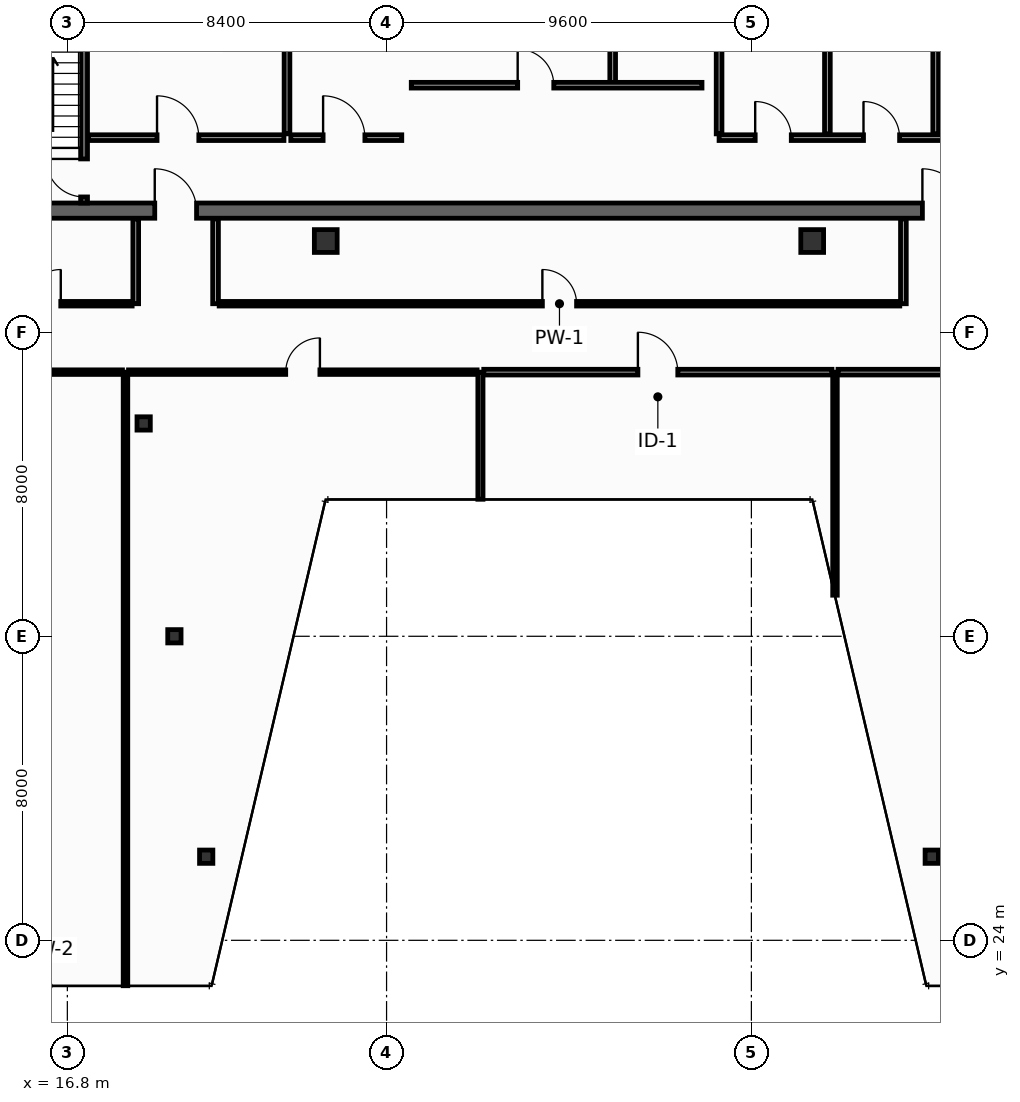
"""IFC4 building model, lengths in metres.
Left out: names, types, materials, properties, quantities, classifications, styles, units other than length and angle.
Written with IfcOpenShell. Run it as: python <this file> out.ifc"""

import sys

from ifc_helpers import new_model, si_unit, direction, frame, frame_2d, origin, origin_2d, place, context, subcontext, project, spatial, rectangle, hollow_rectangle, extrude, element, fill, save


model = new_model("IFC4")
c1 = context("Model", 3, precision=1e-05, world=origin(), true_north=direction((0.0, 1.0)))
c2 = subcontext(c1, "Body", "Model", "MODEL_VIEW")
j1 = project(units=[si_unit("LENGTHUNIT", "METRE"), si_unit("PLANEANGLEUNIT", "RADIAN")], contexts=[c1])
p1 = place(None, origin())
s1 = spatial("IfcSite", under=j1, at=p1, CompositionType="ELEMENT")
p2 = place(p1, origin())
s2 = spatial("IfcBuilding", under=s1, at=p2, CompositionType="ELEMENT")
p3 = place(p2, frame((0.0, 0.0, 264.8)))
s3 = spatial("IfcBuildingStorey", under=s2, at=p3, CompositionType="ELEMENT", Elevation=264.8)
p4 = place(p3, frame((13.7, 43.2, 0.0), z_axis=(0.0, 0.0, 1.0), x_axis=(1.0, 0.0, 0.0)))
e1 = element("IfcWall", 1, at=p4, inside=s3, PredefinedType="SHEAR", context=c2, shape_type="SweptSolid", body=[
    extrude(rectangle(XDim=32.5, YDim=0.4, at=frame_2d((16.25, 0.0))), origin(), (0.0, 0.0, 1.0), 3.55),
])
p5 = place(p4, frame((5.4, 0.0, 0.0)))
e2 = element("IfcOpeningElement", 2, at=p5, cuts=e1, PredefinedType="OPENING", context=c2, shape_type="SweptSolid", body=[
    extrude(rectangle(XDim=1.1, YDim=2.15, at=frame_2d((0.55, 1.075))), frame((0.0, 0.21, 0.0), z_axis=(0.0, -1.0, 0.0), x_axis=(1.0, 0.0, 0.0)), (0.0, 0.0, 1.0), 0.42),
])
p6 = place(p4, frame((25.6, 0.0, 0.0)))
e3 = element("IfcOpeningElement", 3, at=p6, cuts=e1, PredefinedType="OPENING", context=c2, shape_type="SweptSolid", body=[
    extrude(rectangle(XDim=1.1, YDim=2.15, at=frame_2d((0.55, 1.075))), frame((0.0, 0.21, 0.0), z_axis=(0.0, -1.0, 0.0), x_axis=(1.0, 0.0, 0.0)), (0.0, 0.0, 1.0), 0.42),
])
for number, where, z_axis, x_axis in (
    (4, (23.6, 42.4, 0.0), (0.0, 0.0, 1.0), (1.0, 0.0, 0.0)),
    (5, (36.4, 42.4, 0.0), (0.0, 0.0, 1.0), (1.0, 0.0, 0.0)),
):
    element("IfcColumn", number, at=place(p3, frame(where, z_axis=z_axis, x_axis=x_axis)), inside=s3, PredefinedType="COLUMN", context=c2, shape_type="SweptSolid", body=[
        extrude(hollow_rectangle(XDim=0.6, YDim=0.6, WallThickness=0.028, at=origin_2d()), origin(), (0.0, 0.0, 1.0), 3.8),
    ])
for number, where, z_axis, x_axis in (
    (6, (20.454, 26.2, 0.0), (0.0, 0.0, 1.0), (1.0, 0.0, 0.0)),
    (7, (39.546, 26.2, 0.0), (0.0, 0.0, 1.0), (1.0, 0.0, 0.0)),
    (8, (19.617, 32.0, 0.0), (0.0, 0.0, 1.0), (1.0, 0.0, 0.0)),
    (9, (18.808, 37.6, 0.0), (0.0, 0.0, 1.0), (1.0, 0.0, 0.0)),
):
    element("IfcColumn", number, at=place(p3, frame(where, z_axis=z_axis, x_axis=x_axis)), inside=s3, PredefinedType="COLUMN", context=c2, shape_type="SweptSolid", body=[
        extrude(hollow_rectangle(XDim=0.35, YDim=0.35, WallThickness=0.016, at=origin_2d()), origin(), (0.0, 0.0, 1.0), 3.8),
    ])
p7 = place(p3, frame((17.24, 43.4, 0.0), z_axis=(0.0, 0.0, 1.0), x_axis=(0.0, 1.0, 0.0)))
e10 = element("IfcWall", 10, at=p7, inside=s3, PredefinedType="SHEAR", context=c2, shape_type="SweptSolid", body=[
    extrude(rectangle(XDim=10.4, YDim=0.18, at=frame_2d((5.2, 0.0))), origin(), (0.0, 0.0, 1.0), 3.55),
])
p8 = place(p7, frame((0.16, 0.0, 0.0)))
e11 = element("IfcOpeningElement", 11, at=p8, cuts=e10, PredefinedType="OPENING", context=c2, shape_type="SweptSolid", body=[
    extrude(rectangle(XDim=1.0, YDim=2.15, at=frame_2d((0.5, 1.075))), frame((0.0, 0.1, 0.0), z_axis=(0.0, -1.0, 0.0), x_axis=(1.0, 0.0, 0.0)), (0.0, 0.0, 1.0), 0.2),
])
p9 = place(p3, frame((17.36, 45.12, 0.0), z_axis=(0.0, 0.0, 1.0), x_axis=(1.0, 0.0, 0.0)))
e12 = element("IfcWall", 12, at=p9, inside=s3, PredefinedType="PARTITIONING", context=c2, shape_type="SweptSolid", body=[
    extrude(rectangle(XDim=5.14, YDim=0.15, at=frame_2d((2.57, 0.0))), origin(), (0.0, 0.0, 1.0), 3.55),
])
p10 = place(p9, frame((1.8, 0.0, 0.0)))
e13 = element("IfcOpeningElement", 13, at=p10, cuts=e12, PredefinedType="OPENING", context=c2, shape_type="SweptSolid", body=[
    extrude(rectangle(XDim=1.1, YDim=2.15, at=frame_2d((0.55, 1.075))), frame((0.0, 0.085, 0.0), z_axis=(0.0, -1.0, 0.0), x_axis=(1.0, 0.0, 0.0)), (0.0, 0.0, 1.0), 0.17),
])
p11 = place(p3, frame((22.58, 50.55, 0.0), z_axis=(0.0, 0.0, 1.0), x_axis=(0.0, -1.0, 0.0)))
e14 = element("IfcWall", 14, at=p11, inside=s3, PredefinedType="PARTITIONING", context=c2, shape_type="SweptSolid", body=[
    extrude(rectangle(XDim=5.33, YDim=0.15, at=frame_2d((2.665, 0.0))), origin(), (0.0, 0.0, 1.0), 3.55),
])
p12 = place(p11, frame((1.8, 0.0, 0.0)))
e15 = element("IfcOpeningElement", 15, at=p12, cuts=e14, PredefinedType="OPENING", context=c2, shape_type="SweptSolid", body=[
    extrude(rectangle(XDim=1.1, YDim=2.15, at=frame_2d((0.55, 1.075))), frame((0.0, 0.085, 0.0), z_axis=(0.0, -1.0, 0.0), x_axis=(1.0, 0.0, 0.0)), (0.0, 0.0, 1.0), 0.17),
])
p13 = place(p3, frame((22.68, 45.12, 0.0), z_axis=(0.0, 0.0, 1.0), x_axis=(1.0, 0.0, 0.0)))
e16 = element("IfcWall", 16, at=p13, inside=s3, PredefinedType="PARTITIONING", context=c2, shape_type="SweptSolid", body=[
    extrude(rectangle(XDim=2.92, YDim=0.15, at=frame_2d((1.46, 0.0))), origin(), (0.0, 0.0, 1.0), 3.55),
])
p14 = place(p13, frame((0.85, 0.0, 0.0)))
e17 = element("IfcOpeningElement", 17, at=p14, cuts=e16, PredefinedType="OPENING", context=c2, shape_type="SweptSolid", body=[
    extrude(rectangle(XDim=1.1, YDim=2.15, at=frame_2d((0.55, 1.075))), frame((0.0, 0.085, 0.0), z_axis=(0.0, -1.0, 0.0), x_axis=(1.0, 0.0, 0.0)), (0.0, 0.0, 1.0), 0.17),
])
p15 = place(p3, frame((31.15, 46.5, 0.0), z_axis=(0.0, 0.0, 1.0), x_axis=(0.0, 1.0, 0.0)))
e18 = element("IfcWall", 18, at=p15, inside=s3, PredefinedType="PARTITIONING", context=c2, shape_type="SweptSolid", body=[
    extrude(rectangle(XDim=4.35, YDim=0.15, at=frame_2d((2.175, 0.0))), origin(), (0.0, 0.0, 1.0), 3.55),
])
p16 = place(p15, frame((1.5, 0.0, 0.0)))
e19 = element("IfcOpeningElement", 19, at=p16, cuts=e18, PredefinedType="OPENING", context=c2, shape_type="SweptSolid", body=[
    extrude(rectangle(XDim=1.05, YDim=2.15, at=frame_2d((0.525, 1.075))), frame((0.0, 0.085, 0.0), z_axis=(0.0, -1.0, 0.0), x_axis=(1.0, 0.0, 0.0)), (0.0, 0.0, 1.0), 0.17),
])
p17 = place(p3, frame((33.95, 45.12, 0.0), z_axis=(0.0, 0.0, 1.0), x_axis=(1.0, 0.0, 0.0)))
e20 = element("IfcWall", 20, at=p17, inside=s3, PredefinedType="PARTITIONING", context=c2, shape_type="SweptSolid", body=[
    extrude(rectangle(XDim=8.55, YDim=0.15, at=frame_2d((4.275, 0.0))), origin(), (0.0, 0.0, 1.0), 3.55),
])
p18 = place(p17, frame((0.95, 0.0, 0.0)))
e21 = element("IfcOpeningElement", 21, at=p18, cuts=e20, PredefinedType="OPENING", context=c2, shape_type="SweptSolid", body=[
    extrude(rectangle(XDim=0.95, YDim=2.15, at=frame_2d((0.475, 1.075))), frame((0.0, 0.085, 0.0), z_axis=(0.0, -1.0, 0.0), x_axis=(1.0, 0.0, 0.0)), (0.0, 0.0, 1.0), 0.17),
])
p19 = place(p17, frame((3.8, 0.0, 0.0)))
e22 = element("IfcOpeningElement", 22, at=p19, cuts=e20, PredefinedType="OPENING", context=c2, shape_type="SweptSolid", body=[
    extrude(rectangle(XDim=0.95, YDim=2.15, at=frame_2d((0.475, 1.075))), frame((0.0, 0.085, 0.0), z_axis=(0.0, -1.0, 0.0), x_axis=(1.0, 0.0, 0.0)), (0.0, 0.0, 1.0), 0.17),
])
p20 = place(p17, frame((6.65, 0.0, 0.0)))
e23 = element("IfcOpeningElement", 23, at=p20, cuts=e20, PredefinedType="OPENING", context=c2, shape_type="SweptSolid", body=[
    extrude(rectangle(XDim=0.95, YDim=2.15, at=frame_2d((0.475, 1.075))), frame((0.0, 0.085, 0.0), z_axis=(0.0, -1.0, 0.0), x_axis=(1.0, 0.0, 0.0)), (0.0, 0.0, 1.0), 0.17),
])
for number, where, z_axis, x_axis in (
    (24, (33.95, 45.22, 0.0), (0.0, 0.0, 1.0), (0.0, 1.0, 0.0)),
    (25, (36.8, 45.22, 0.0), (0.0, 0.0, 1.0), (0.0, 1.0, 0.0)),
    (26, (39.65, 45.22, 0.0), (0.0, 0.0, 1.0), (0.0, 1.0, 0.0)),
):
    element("IfcWall", number, at=place(p3, frame(where, z_axis=z_axis, x_axis=x_axis)), inside=s3, PredefinedType="PARTITIONING", context=c2, shape_type="SweptSolid", body=[
        extrude(rectangle(XDim=2.33, YDim=0.15, at=frame_2d((1.165, 0.0))), origin(), (0.0, 0.0, 1.0), 3.55),
    ])
p21 = place(p3, frame((25.85, 46.5, 0.0), z_axis=(0.0, 0.0, 1.0), x_axis=(1.0, 0.0, 0.0)))
e27 = element("IfcWall", 27, at=p21, inside=s3, PredefinedType="PARTITIONING", context=c2, shape_type="SweptSolid", body=[
    extrude(rectangle(XDim=7.65, YDim=0.15, at=frame_2d((3.825, 0.0))), origin(), (0.0, 0.0, 1.0), 3.55),
])
p22 = place(p21, frame((2.8, 0.0, 0.0)))
e28 = element("IfcOpeningElement", 28, at=p22, cuts=e27, PredefinedType="OPENING", context=c2, shape_type="SweptSolid", body=[
    extrude(rectangle(XDim=0.95, YDim=2.15, at=frame_2d((0.475, 1.075))), frame((0.0, 0.085, 0.0), z_axis=(0.0, -1.0, 0.0), x_axis=(1.0, 0.0, 0.0)), (0.0, 0.0, 1.0), 0.17),
])
for number, where, z_axis, x_axis in (
    (29, (18.6, 40.75, 0.0), (0.0, 0.0, 1.0), (0.0, 1.0, 0.0)),
    (30, (20.7, 40.75, 0.0), (0.0, 0.0, 1.0), (0.0, 1.0, 0.0)),
    (31, (38.8, 40.75, 0.0), (0.0, 0.0, 1.0), (0.0, 1.0, 0.0)),
):
    element("IfcWall", number, at=place(p3, frame(where, z_axis=z_axis, x_axis=x_axis)), inside=s3, PredefinedType="PARTITIONING", context=c2, shape_type="SweptSolid", body=[
        extrude(rectangle(XDim=2.23, YDim=0.15, at=frame_2d((1.115, 0.0))), origin(), (0.0, 0.0, 1.0), 3.55),
    ])
p23 = place(p3, frame((13.85, 40.75, 0.0), z_axis=(0.0, 0.0, 1.0), x_axis=(1.0, 0.0, 0.0)))
e32 = element("IfcWall", 32, at=p23, inside=s3, PredefinedType="PARTITIONING", context=c2, shape_type="SweptSolid", body=[
    extrude(rectangle(XDim=4.655, YDim=0.12, at=frame_2d((2.327, 0.0))), origin(), (0.0, 0.0, 1.0), 3.55),
])
p24 = place(p23, frame((1.877, 0.0, 0.0)))
e33 = element("IfcOpeningElement", 33, at=p24, cuts=e32, PredefinedType="OPENING", context=c2, shape_type="SweptSolid", body=[
    extrude(rectangle(XDim=0.9, YDim=2.1, at=frame_2d((0.45, 1.05))), frame((0.0, 0.07, 0.0), z_axis=(0.0, -1.0, 0.0), x_axis=(1.0, 0.0, 0.0)), (0.0, 0.0, 1.0), 0.14),
])
p25 = place(p3, frame((20.795, 40.75, 0.0), z_axis=(0.0, 0.0, 1.0), x_axis=(1.0, 0.0, 0.0)))
e34 = element("IfcWall", 34, at=p25, inside=s3, PredefinedType="PARTITIONING", context=c2, shape_type="SweptSolid", body=[
    extrude(rectangle(XDim=17.91, YDim=0.12, at=frame_2d((8.955, 0.0))), origin(), (0.0, 0.0, 1.0), 2.947),
])
p26 = place(p25, frame((8.505, 0.0, 0.0)))
e35 = element("IfcOpeningElement", 35, at=p26, cuts=e34, PredefinedType="OPENING", context=c2, shape_type="SweptSolid", body=[
    extrude(rectangle(XDim=0.9, YDim=2.1, at=frame_2d((0.45, 1.05))), frame((0.0, 0.07, 0.0), z_axis=(0.0, -1.0, 0.0), x_axis=(1.0, 0.0, 0.0)), (0.0, 0.0, 1.0), 0.14),
])
p27 = place(p3, frame((18.33, 22.805, 0.0), z_axis=(0.0, 0.0, 1.0), x_axis=(0.0, 1.0, 0.0)))
e36 = element("IfcWall", 36, at=p27, inside=s3, PredefinedType="PARTITIONING", context=c2, shape_type="SweptSolid", body=[
    extrude(rectangle(XDim=16.145, YDim=0.12, at=frame_2d((8.073, 0.0))), origin(), (0.0, 0.0, 1.0), 2.947),
])
p28 = place(p3, frame((27.67, 35.605, 0.0), z_axis=(0.0, 0.0, 1.0), x_axis=(0.0, 1.0, 0.0)))
e37 = element("IfcWall", 37, at=p28, inside=s3, PredefinedType="PARTITIONING", context=c2, shape_type="SweptSolid", body=[
    extrude(rectangle(XDim=3.345, YDim=0.135, at=frame_2d((1.672, 0.0))), origin(), (0.0, 0.0, 1.0), 3.55),
])
p29 = place(p3, frame((37.0, 33.081, 0.0), z_axis=(0.0, 0.0, 1.0), x_axis=(0.0, 1.0, 0.0)))
e38 = element("IfcWall", 38, at=p29, inside=s3, PredefinedType="PARTITIONING", context=c2, shape_type="SweptSolid", body=[
    extrude(rectangle(XDim=5.869, YDim=0.12, at=frame_2d((2.935, 0.0))), origin(), (0.0, 0.0, 1.0), 3.55),
])
p30 = place(p3, frame((6.483, 38.95, 0.0), z_axis=(0.0, 0.0, 1.0), x_axis=(1.0, 0.0, 0.0)))
e39 = element("IfcWall", 39, at=p30, inside=s3, PredefinedType="PARTITIONING", context=c2, shape_type="SweptSolid", body=[
    extrude(rectangle(XDim=11.767, YDim=0.12, at=frame_2d((5.883, 0.0))), origin(), (0.0, 0.0, 1.0), 3.085),
])
p31 = place(p30, frame((5.433, 0.0, 0.0)))
e40 = element("IfcOpeningElement", 40, at=p31, cuts=e39, PredefinedType="OPENING", context=c2, shape_type="SweptSolid", body=[
    extrude(rectangle(XDim=0.9, YDim=2.1, at=frame_2d((0.45, 1.05))), frame((0.0, 0.07, 0.0), z_axis=(0.0, -1.0, 0.0), x_axis=(1.0, 0.0, 0.0)), (0.0, 0.0, 1.0), 0.14),
])
p32 = place(p3, frame((18.41, 38.95, 0.0), z_axis=(0.0, 0.0, 1.0), x_axis=(1.0, 0.0, 0.0)))
e41 = element("IfcWall", 41, at=p32, inside=s3, PredefinedType="PARTITIONING", context=c2, shape_type="SweptSolid", body=[
    extrude(rectangle(XDim=9.173, YDim=0.12, at=frame_2d((4.586, 0.0))), origin(), (0.0, 0.0, 1.0), 2.947),
])
p33 = place(p32, frame((4.136, 0.0, 0.0)))
e42 = element("IfcOpeningElement", 42, at=p33, cuts=e41, PredefinedType="OPENING", context=c2, shape_type="SweptSolid", body=[
    extrude(rectangle(XDim=0.9, YDim=2.1, at=frame_2d((0.45, 1.05))), frame((0.0, 0.07, 0.0), z_axis=(0.0, -1.0, 0.0), x_axis=(1.0, 0.0, 0.0)), (0.0, 0.0, 1.0), 0.14),
])
p34 = place(p3, frame((27.758, 38.95, 0.0), z_axis=(0.0, 0.0, 1.0), x_axis=(1.0, 0.0, 0.0)))
e43 = element("IfcWall", 43, at=p34, inside=s3, PredefinedType="PARTITIONING", context=c2, shape_type="SweptSolid", body=[
    extrude(rectangle(XDim=9.162, YDim=0.15, at=frame_2d((4.581, 0.0))), origin(), (0.0, 0.0, 1.0), 3.55),
])
p35 = place(p34, frame((4.056, 0.0, 0.0)))
e44 = element("IfcOpeningElement", 44, at=p35, cuts=e43, PredefinedType="OPENING", context=c2, shape_type="SweptSolid", body=[
    extrude(rectangle(XDim=1.05, YDim=2.15, at=frame_2d((0.525, 1.075))), frame((0.0, 0.085, 0.0), z_axis=(0.0, -1.0, 0.0), x_axis=(1.0, 0.0, 0.0)), (0.0, 0.0, 1.0), 0.17),
])
p36 = place(p3, frame((37.08, 38.95, 0.0), z_axis=(0.0, 0.0, 1.0), x_axis=(1.0, 0.0, 0.0)))
e45 = element("IfcWall", 45, at=p36, inside=s3, PredefinedType="PARTITIONING", context=c2, shape_type="SweptSolid", body=[
    extrude(rectangle(XDim=9.172, YDim=0.15, at=frame_2d((4.586, 0.0))), origin(), (0.0, 0.0, 1.0), 2.947),
])
p37 = place(p36, frame((4.501, 0.0, 0.0)))
e46 = element("IfcOpeningElement", 46, at=p37, cuts=e45, PredefinedType="OPENING", context=c2, shape_type="SweptSolid", body=[
    extrude(rectangle(XDim=1.05, YDim=2.15, at=frame_2d((0.525, 1.075))), frame((0.0, 0.085, 0.0), z_axis=(0.0, -1.0, 0.0), x_axis=(1.0, 0.0, 0.0)), (0.0, 0.0, 1.0), 0.17),
])
p38 = place(p8, origin())
e47 = element("IfcDoor", 47, at=p38, inside=s3, OperationType="SINGLE_SWING_RIGHT", PredefinedType="DOOR", context=c2, shape_type="SweptSolid", body=[
    extrude(rectangle(XDim=1.0, YDim=2.15, at=frame_2d((0.5, 1.075))), frame((0.0, 0.025, 0.0), z_axis=(0.0, -1.0, 0.0), x_axis=(1.0, 0.0, 0.0)), (0.0, 0.0, 1.0), 0.05),
])
fill(e11, e47)
p39 = place(p10, origin())
e48 = element("IfcDoor", 48, at=p39, inside=s3, OperationType="SINGLE_SWING_LEFT", PredefinedType="DOOR", context=c2, shape_type="SweptSolid", body=[
    extrude(rectangle(XDim=1.1, YDim=2.15, at=frame_2d((0.55, 1.075))), frame((0.0, 0.025, 0.0), z_axis=(0.0, -1.0, 0.0), x_axis=(1.0, 0.0, 0.0)), (0.0, 0.0, 1.0), 0.05),
])
fill(e13, e48)
p40 = place(p14, origin())
e49 = element("IfcDoor", 49, at=p40, inside=s3, OperationType="SINGLE_SWING_LEFT", PredefinedType="DOOR", context=c2, shape_type="SweptSolid", body=[
    extrude(rectangle(XDim=1.1, YDim=2.15, at=frame_2d((0.55, 1.075))), frame((0.0, 0.025, 0.0), z_axis=(0.0, -1.0, 0.0), x_axis=(1.0, 0.0, 0.0)), (0.0, 0.0, 1.0), 0.05),
])
fill(e17, e49)
p41 = place(p5, origin())
e50 = element("IfcDoor", 50, at=p41, inside=s3, OperationType="SINGLE_SWING_LEFT", PredefinedType="DOOR", context=c2, shape_type="SweptSolid", body=[
    extrude(rectangle(XDim=1.1, YDim=2.15, at=frame_2d((0.55, 1.075))), frame((0.0, 0.025, 0.0), z_axis=(0.0, -1.0, 0.0), x_axis=(1.0, 0.0, 0.0)), (0.0, 0.0, 1.0), 0.05),
])
fill(e2, e50)
p42 = place(p6, origin())
e51 = element("IfcDoor", 51, at=p42, inside=s3, OperationType="SINGLE_SWING_LEFT", PredefinedType="DOOR", context=c2, shape_type="SweptSolid", body=[
    extrude(rectangle(XDim=1.1, YDim=2.15, at=frame_2d((0.55, 1.075))), frame((0.0, 0.025, 0.0), z_axis=(0.0, -1.0, 0.0), x_axis=(1.0, 0.0, 0.0)), (0.0, 0.0, 1.0), 0.05),
])
fill(e3, e51)
p43 = place(p18, origin())
e52 = element("IfcDoor", 52, at=p43, inside=s3, OperationType="SINGLE_SWING_LEFT", PredefinedType="DOOR", context=c2, shape_type="SweptSolid", body=[
    extrude(rectangle(XDim=0.95, YDim=2.15, at=frame_2d((0.475, 1.075))), frame((0.0, 0.025, 0.0), z_axis=(0.0, -1.0, 0.0), x_axis=(1.0, 0.0, 0.0)), (0.0, 0.0, 1.0), 0.05),
])
fill(e21, e52)
p44 = place(p19, origin())
e53 = element("IfcDoor", 53, at=p44, inside=s3, OperationType="SINGLE_SWING_LEFT", PredefinedType="DOOR", context=c2, shape_type="SweptSolid", body=[
    extrude(rectangle(XDim=0.95, YDim=2.15, at=frame_2d((0.475, 1.075))), frame((0.0, 0.025, 0.0), z_axis=(0.0, -1.0, 0.0), x_axis=(1.0, 0.0, 0.0)), (0.0, 0.0, 1.0), 0.05),
])
fill(e22, e53)
p45 = place(p22, origin())
e54 = element("IfcDoor", 54, at=p45, inside=s3, OperationType="SINGLE_SWING_LEFT", PredefinedType="DOOR", context=c2, shape_type="SweptSolid", body=[
    extrude(rectangle(XDim=0.95, YDim=2.15, at=frame_2d((0.475, 1.075))), frame((0.0, 0.025, 0.0), z_axis=(0.0, -1.0, 0.0), x_axis=(1.0, 0.0, 0.0)), (0.0, 0.0, 1.0), 0.05),
])
fill(e28, e54)
p46 = place(p24, origin())
e55 = element("IfcDoor", 55, at=p46, inside=s3, OperationType="SINGLE_SWING_RIGHT", PredefinedType="DOOR", context=c2, shape_type="SweptSolid", body=[
    extrude(rectangle(XDim=0.9, YDim=2.1, at=frame_2d((0.45, 1.05))), frame((0.0, 0.025, 0.0), z_axis=(0.0, -1.0, 0.0), x_axis=(1.0, 0.0, 0.0)), (0.0, 0.0, 1.0), 0.05),
])
fill(e33, e55)
p47 = place(p26, origin())
e56 = element("IfcDoor", 56, at=p47, inside=s3, OperationType="SINGLE_SWING_LEFT", PredefinedType="DOOR", context=c2, shape_type="SweptSolid", body=[
    extrude(rectangle(XDim=0.9, YDim=2.1, at=frame_2d((0.45, 1.05))), frame((0.0, 0.025, 0.0), z_axis=(0.0, -1.0, 0.0), x_axis=(1.0, 0.0, 0.0)), (0.0, 0.0, 1.0), 0.05),
])
fill(e35, e56)
p48 = place(p33, origin())
e57 = element("IfcDoor", 57, at=p48, inside=s3, OperationType="SINGLE_SWING_RIGHT", PredefinedType="DOOR", context=c2, shape_type="SweptSolid", body=[
    extrude(rectangle(XDim=0.9, YDim=2.1, at=frame_2d((0.45, 1.05))), frame((0.0, 0.025, 0.0), z_axis=(0.0, -1.0, 0.0), x_axis=(1.0, 0.0, 0.0)), (0.0, 0.0, 1.0), 0.05),
])
fill(e42, e57)
p49 = place(p35, origin())
e58 = element("IfcDoor", 58, at=p49, inside=s3, OperationType="SINGLE_SWING_LEFT", PredefinedType="DOOR", context=c2, shape_type="SweptSolid", body=[
    extrude(rectangle(XDim=1.05, YDim=2.15, at=frame_2d((0.525, 1.075))), frame((0.0, 0.025, 0.0), z_axis=(0.0, -1.0, 0.0), x_axis=(1.0, 0.0, 0.0)), (0.0, 0.0, 1.0), 0.05),
])
fill(e44, e58)
save(model, sys.argv[1])
